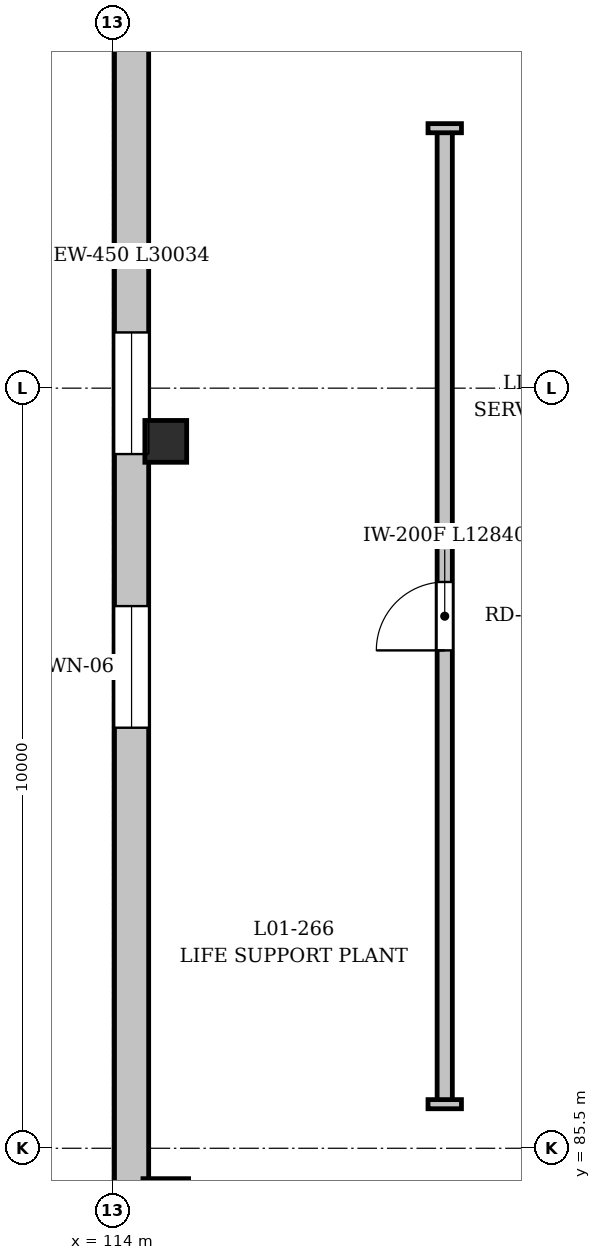
"""IFC4 building model, lengths in metres.
Left out: names, types, materials, properties, quantities, classifications, styles, units other than length and angle.
Written with IfcOpenShell. Run it as: python <this file> out.ifc"""

import sys

from ifc_helpers import new_model, si_unit, direction, frame, frame_2d, origin, origin_2d, place, context, subcontext, project, spatial, rectangle, extrude, element, fill, save


model = new_model("IFC4")
c1 = context("Model", 3, precision=1e-05, world=origin(), true_north=direction((0.0, 1.0)))
c2 = subcontext(c1, "Body", "Model", "MODEL_VIEW")
j1 = project(units=[si_unit("LENGTHUNIT", "METRE"), si_unit("PLANEANGLEUNIT", "RADIAN")], contexts=[c1])
p1 = place(None, origin())
s1 = spatial("IfcSite", under=j1, at=p1, CompositionType="ELEMENT")
p2 = place(p1, origin())
s2 = spatial("IfcBuilding", under=s1, at=p2, CompositionType="ELEMENT")
p3 = place(p2, origin())
s3 = spatial("IfcBuildingStorey", under=s2, at=p3, CompositionType="ELEMENT", Elevation=0.0)
p4 = place(p3, frame((114.7, 84.8, 0.0), z_axis=(0.0, 0.0, 1.0), x_axis=(1.0, 0.0, 0.0)))
e1 = element("IfcColumn", 1, at=p4, inside=s3, PredefinedType="COLUMN", context=c2, shape_type="SweptSolid", body=[
    extrude(rectangle(XDim=0.6, YDim=0.6, at=origin_2d()), origin(), (0.0, 0.0, 1.0), 5.05),
])
p5 = place(p3, frame((114.7, 94.8, 0.0), z_axis=(0.0, 0.0, 1.0), x_axis=(1.0, 0.0, 0.0)))
e2 = element("IfcColumn", 2, at=p5, inside=s3, PredefinedType="COLUMN", context=c2, shape_type="SweptSolid", body=[
    extrude(rectangle(XDim=0.55, YDim=0.55, at=origin_2d()), origin(), (0.0, 0.0, 1.0), 5.05),
])
p6 = place(p3, frame((114.25, 82.216, 0.0), z_axis=(0.0, 0.0, 1.0), x_axis=(0.0, 1.0, 0.0)))
e3 = element("IfcWall", 3, at=p6, inside=s3, PredefinedType="SOLIDWALL", context=c2, shape_type="SweptSolid", body=[
    extrude(rectangle(XDim=30.034, YDim=0.45, at=frame_2d((15.017, 0.0))), origin(), (0.0, 0.0, 1.0), 4.04),
])
p7 = place(p6, frame((8.817, 0.0, 0.9)))
e4 = element("IfcOpeningElement", 4, at=p7, cuts=e3, PredefinedType="OPENING", context=c2, shape_type="SweptSolid", body=[
    extrude(rectangle(XDim=1.6, YDim=1.6, at=frame_2d((0.8, 0.8))), frame((0.0, 0.235, 0.0), z_axis=(0.0, -1.0, 0.0), x_axis=(1.0, 0.0, 0.0)), (0.0, 0.0, 1.0), 0.47),
])
p8 = place(p6, frame((12.417, 0.0, 0.9)))
e5 = element("IfcOpeningElement", 5, at=p8, cuts=e3, PredefinedType="OPENING", context=c2, shape_type="SweptSolid", body=[
    extrude(rectangle(XDim=1.6, YDim=1.6, at=frame_2d((0.8, 0.8))), frame((0.0, 0.235, 0.0), z_axis=(0.0, -1.0, 0.0), x_axis=(1.0, 0.0, 0.0)), (0.0, 0.0, 1.0), 0.47),
])
p9 = place(p6, frame((19.617, 0.0, 0.9)))
e6 = element("IfcOpeningElement", 6, at=p9, cuts=e3, PredefinedType="OPENING", context=c2, shape_type="SweptSolid", body=[
    extrude(rectangle(XDim=1.6, YDim=1.6, at=frame_2d((0.8, 0.8))), frame((0.0, 0.235, 0.0), z_axis=(0.0, -1.0, 0.0), x_axis=(1.0, 0.0, 0.0)), (0.0, 0.0, 1.0), 0.47),
])
p10 = place(p3, frame((118.37, 86.08, 0.0), z_axis=(0.0, 0.0, 1.0), x_axis=(0.0, 1.0, 0.0)))
e7 = element("IfcWall", 7, at=p10, inside=s3, PredefinedType="PARTITIONING", context=c2, shape_type="SweptSolid", body=[
    extrude(rectangle(XDim=12.84, YDim=0.2, at=frame_2d((6.42, 0.0))), origin(), (0.0, 0.0, 1.0), 4.14),
])
p11 = place(p10, frame((5.97, 0.0, 0.0)))
e8 = element("IfcOpeningElement", 8, at=p11, cuts=e7, PredefinedType="OPENING", context=c2, shape_type="SweptSolid", body=[
    extrude(rectangle(XDim=0.9, YDim=2.1, at=frame_2d((0.45, 1.05))), frame((0.0, 0.11, 0.0), z_axis=(0.0, -1.0, 0.0), x_axis=(1.0, 0.0, 0.0)), (0.0, 0.0, 1.0), 0.22),
])
for number, where, z_axis, x_axis in (
    (9, (118.59, 86.08, 0.0), (0.0, 0.0, 1.0), (-1.0, 0.0, 0.0)),
    (10, (118.59, 98.92, 0.0), (0.0, 0.0, 1.0), (-1.0, 0.0, 0.0)),
):
    element("IfcWall", number, at=place(p3, frame(where, z_axis=z_axis, x_axis=x_axis)), inside=s3, PredefinedType="PARTITIONING", context=c2, shape_type="SweptSolid", body=[
        extrude(rectangle(XDim=0.44, YDim=0.12, at=frame_2d((0.22, 0.0))), origin(), (0.0, 0.0, 1.0), 5.05),
    ])
p12 = place(p7, origin())
e11 = element("IfcWindow", 11, at=p12, inside=s3, PartitioningType="DOUBLE_PANEL_VERTICAL", PredefinedType="WINDOW", context=c2, shape_type="SweptSolid", body=[
    extrude(rectangle(XDim=1.6, YDim=1.6, at=frame_2d((0.8, 0.8))), frame((0.0, 0.03, 0.0), z_axis=(0.0, -1.0, 0.0), x_axis=(1.0, 0.0, 0.0)), (0.0, 0.0, 1.0), 0.06),
])
fill(e4, e11)
p13 = place(p8, origin())
e12 = element("IfcWindow", 12, at=p13, inside=s3, PartitioningType="DOUBLE_PANEL_VERTICAL", PredefinedType="WINDOW", context=c2, shape_type="SweptSolid", body=[
    extrude(rectangle(XDim=1.6, YDim=1.6, at=frame_2d((0.8, 0.8))), frame((0.0, 0.03, 0.0), z_axis=(0.0, -1.0, 0.0), x_axis=(1.0, 0.0, 0.0)), (0.0, 0.0, 1.0), 0.06),
])
fill(e5, e12)
p14 = place(p11, origin())
e13 = element("IfcDoor", 13, at=p14, inside=s3, OperationType="SINGLE_SWING_RIGHT", PredefinedType="DOOR", context=c2, shape_type="SweptSolid", body=[
    extrude(rectangle(XDim=0.9, YDim=2.1, at=frame_2d((0.45, 1.05))), frame((0.0, 0.025, 0.0), z_axis=(0.0, -1.0, 0.0), x_axis=(1.0, 0.0, 0.0)), (0.0, 0.0, 1.0), 0.05),
])
fill(e8, e13)
save(model, sys.argv[1])
